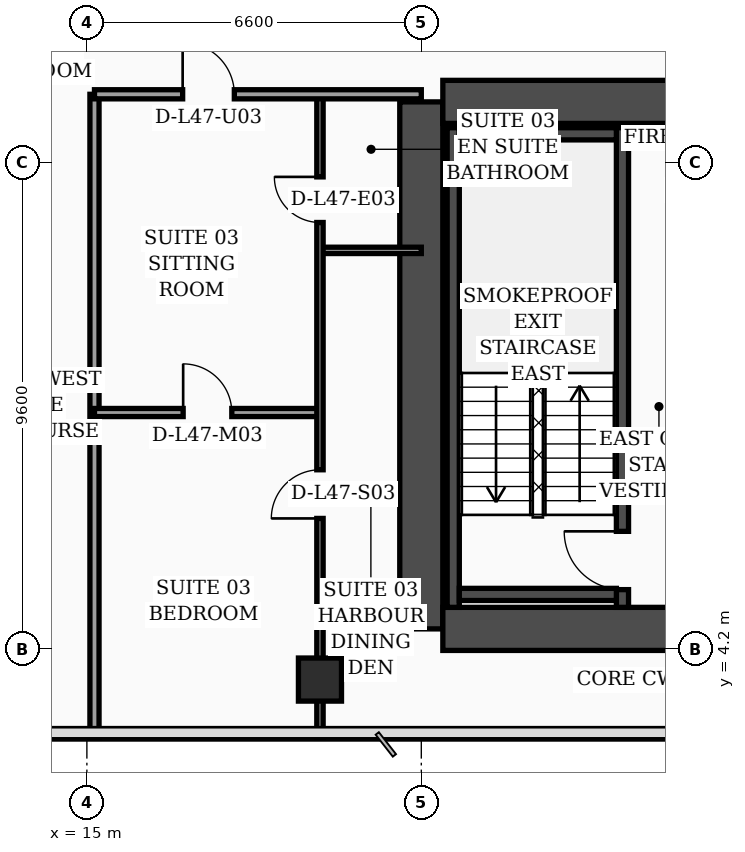
"""IFC4 building model, lengths in metres.
Left out: names, types, materials, properties, quantities, classifications, styles, units other than length and angle.
Written with IfcOpenShell. Run it as: python <this file> out.ifc"""

import sys

from ifc_helpers import new_model, si_unit, direction, frame, frame_2d, origin, origin_2d, place, context, subcontext, project, spatial, rectangle, hollow_rectangle, extrude, element, fill, save


model = new_model("IFC4")
c1 = context("Model", 3, precision=1e-05, world=origin(), true_north=direction((0.0, 1.0)))
c2 = subcontext(c1, "Body", "Model", "MODEL_VIEW")
j1 = project(units=[si_unit("LENGTHUNIT", "METRE"), si_unit("PLANEANGLEUNIT", "RADIAN")], contexts=[c1])
p1 = place(None, origin())
s1 = spatial("IfcSite", under=j1, at=p1, CompositionType="ELEMENT")
p2 = place(p1, origin())
s2 = spatial("IfcBuilding", under=s1, at=p2, CompositionType="ELEMENT")
p3 = place(p2, frame((0.0, 0.0, 191.3)))
s3 = spatial("IfcBuildingStorey", under=s2, at=p3, CompositionType="ELEMENT", Elevation=191.3)
p4 = place(p3, frame((21.6, 4.6, 0.0), z_axis=(0.0, 0.0, 1.0), x_axis=(0.0, 1.0, 0.0)))
e1 = element("IfcWall", 1, at=p4, inside=s3, PredefinedType="SHEAR", context=c2, shape_type="SweptSolid", body=[
    extrude(rectangle(XDim=10.4, YDim=0.85, at=frame_2d((5.2, 0.0))), origin(), (0.0, 0.0, 1.0), 3.56),
])
p5 = place(p3, frame((22.025, 15.0, 0.0), z_axis=(0.0, 0.0, 1.0), x_axis=(1.0, 0.0, 0.0)))
e2 = element("IfcWall", 2, at=p5, inside=s3, PredefinedType="SHEAR", context=c2, shape_type="SweptSolid", body=[
    extrude(rectangle(XDim=9.95, YDim=0.85, at=frame_2d((4.975, 0.0))), origin(), (0.0, 0.0, 1.0), 3.56),
])
p6 = place(p5, frame((4.88, 0.0, 0.0)))
e3 = element("IfcOpeningElement", 3, at=p6, cuts=e2, PredefinedType="OPENING", context=c2, shape_type="SweptSolid", body=[
    extrude(rectangle(XDim=1.1, YDim=2.2, at=frame_2d((0.55, 1.1))), frame((0.0, 0.435, 0.0), z_axis=(0.0, -1.0, 0.0), x_axis=(1.0, 0.0, 0.0)), (0.0, 0.0, 1.0), 0.87),
])
p7 = place(p3, frame((22.025, 4.6, 0.0), z_axis=(0.0, 0.0, 1.0), x_axis=(1.0, 0.0, 0.0)))
e4 = element("IfcWall", 4, at=p7, inside=s3, PredefinedType="SHEAR", context=c2, shape_type="SweptSolid", body=[
    extrude(rectangle(XDim=9.95, YDim=0.85, at=frame_2d((4.975, 0.0))), origin(), (0.0, 0.0, 1.0), 3.56),
])
p8 = place(p3, frame((22.23, 5.025, 0.0), z_axis=(0.0, 0.0, 1.0), x_axis=(0.0, 1.0, 0.0)))
e5 = element("IfcWall", 5, at=p8, inside=s3, PredefinedType="SOLIDWALL", context=c2, shape_type="SweptSolid", body=[
    extrude(rectangle(XDim=9.465, YDim=0.24, at=frame_2d((4.732, 0.0))), origin(), (0.0, 0.0, 1.0), 3.56),
])
p9 = place(p3, frame((25.57, 5.025, 0.0), z_axis=(0.0, 0.0, 1.0), x_axis=(0.0, 1.0, 0.0)))
e6 = element("IfcWall", 6, at=p9, inside=s3, PredefinedType="SOLIDWALL", context=c2, shape_type="SweptSolid", body=[
    extrude(rectangle(XDim=9.465, YDim=0.24, at=frame_2d((4.732, 0.0))), origin(), (0.0, 0.0, 1.0), 3.56),
])
p10 = place(p9, frame((0.35, 0.0, 0.0)))
e7 = element("IfcOpeningElement", 7, at=p10, cuts=e6, PredefinedType="OPENING", context=c2, shape_type="SweptSolid", body=[
    extrude(rectangle(XDim=1.15, YDim=2.2, at=frame_2d((0.575, 1.1))), frame((0.0, 0.13, 0.0), z_axis=(0.0, -1.0, 0.0), x_axis=(1.0, 0.0, 0.0)), (0.0, 0.0, 1.0), 0.26),
])
for number, where, z_axis, x_axis in (
    (8, (22.35, 5.28, 0.0), (0.0, 0.0, 1.0), (1.0, 0.0, 0.0)),
    (9, (22.35, 14.37, 0.0), (0.0, 0.0, 1.0), (1.0, 0.0, 0.0)),
):
    element("IfcWall", number, at=place(p3, frame(where, z_axis=z_axis, x_axis=x_axis)), inside=s3, PredefinedType="SOLIDWALL", context=c2, shape_type="SweptSolid", body=[
        extrude(rectangle(XDim=3.1, YDim=0.24, at=frame_2d((1.55, 0.0))), origin(), (0.0, 0.0, 1.0), 3.56),
    ])
p11 = place(p3, frame((19.6, 3.6, 0.0), z_axis=(0.0, 0.0, 1.0), x_axis=(1.0, 0.0, 0.0)))
e10 = element("IfcColumn", 10, at=p11, inside=s3, PredefinedType="COLUMN", context=c2, shape_type="SweptSolid", body=[
    extrude(hollow_rectangle(XDim=0.85, YDim=0.85, WallThickness=0.036, at=origin_2d()), origin(), (0.0, 0.0, 1.0), 3.56),
])
p12 = place(p3, frame((15.15, 2.44, 0.0), z_axis=(0.0, 0.0, 1.0), x_axis=(0.0, 1.0, 0.0)))
e11 = element("IfcWall", 11, at=p12, inside=s3, PredefinedType="PARTITIONING", context=c2, shape_type="SweptSolid", body=[
    extrude(rectangle(XDim=12.71, YDim=0.18, at=frame_2d((6.355, 0.0))), origin(), (0.0, 0.0, 1.0), 3.09),
])
p13 = place(p3, frame((19.6, 12.07, 0.0), z_axis=(0.0, 0.0, 1.0), x_axis=(1.0, 0.0, 0.0)))
e12 = element("IfcWall", 12, at=p13, inside=s3, PredefinedType="PARTITIONING", context=c2, shape_type="SweptSolid", body=[
    extrude(rectangle(XDim=2.0, YDim=0.125, at=frame_2d((1.0, 0.0))), origin(), (0.0, 0.0, 1.0), 3.56),
])
p14 = place(p3, frame((15.15, 8.87, 0.0), z_axis=(0.0, 0.0, 1.0), x_axis=(1.0, 0.0, 0.0)))
e13 = element("IfcWall", 13, at=p14, inside=s3, PredefinedType="PARTITIONING", context=c2, shape_type="SweptSolid", body=[
    extrude(rectangle(XDim=4.45, YDim=0.16, at=frame_2d((2.225, 0.0))), origin(), (0.0, 0.0, 1.0), 3.56),
])
p15 = place(p14, frame((1.75, 0.0, 0.0)))
e14 = element("IfcOpeningElement", 14, at=p15, cuts=e13, PredefinedType="OPENING", context=c2, shape_type="SweptSolid", body=[
    extrude(rectangle(XDim=0.96, YDim=2.2, at=frame_2d((0.48, 1.1))), frame((0.0, 0.09, 0.0), z_axis=(0.0, -1.0, 0.0), x_axis=(1.0, 0.0, 0.0)), (0.0, 0.0, 1.0), 0.18),
])
p16 = place(p3, frame((19.6, 2.44, 0.0), z_axis=(0.0, 0.0, 1.0), x_axis=(0.0, 1.0, 0.0)))
e15 = element("IfcWall", 15, at=p16, inside=s3, PredefinedType="PARTITIONING", context=c2, shape_type="SweptSolid", body=[
    extrude(rectangle(XDim=12.71, YDim=0.125, at=frame_2d((6.355, 0.0))), origin(), (0.0, 0.0, 1.0), 2.49),
])
p17 = place(p16, frame((4.34, 0.0, 0.0)))
e16 = element("IfcOpeningElement", 16, at=p17, cuts=e15, PredefinedType="OPENING", context=c2, shape_type="SweptSolid", body=[
    extrude(rectangle(XDim=0.96, YDim=2.2, at=frame_2d((0.48, 1.1))), frame((0.0, 0.073, 0.0), z_axis=(0.0, -1.0, 0.0), x_axis=(1.0, 0.0, 0.0)), (0.0, 0.0, 1.0), 0.145),
])
p18 = place(p16, frame((10.18, 0.0, 0.0)))
e17 = element("IfcOpeningElement", 17, at=p18, cuts=e15, PredefinedType="OPENING", context=c2, shape_type="SweptSolid", body=[
    extrude(rectangle(XDim=0.9, YDim=2.15, at=frame_2d((0.45, 1.075))), frame((0.0, 0.073, 0.0), z_axis=(0.0, -1.0, 0.0), x_axis=(1.0, 0.0, 0.0)), (0.0, 0.0, 1.0), 0.145),
])
p19 = place(p3, frame((15.15, 15.15, 0.0), z_axis=(0.0, 0.0, 1.0), x_axis=(1.0, 0.0, 0.0)))
e18 = element("IfcWall", 18, at=p19, inside=s3, PredefinedType="PARTITIONING", context=c2, shape_type="SweptSolid", body=[
    extrude(rectangle(XDim=6.45, YDim=0.18, at=frame_2d((3.225, 0.0))), origin(), (0.0, 0.0, 1.0), 2.49),
])
p20 = place(p19, frame((1.74, 0.0, 0.0)))
e19 = element("IfcOpeningElement", 19, at=p20, cuts=e18, PredefinedType="OPENING", context=c2, shape_type="SweptSolid", body=[
    extrude(rectangle(XDim=1.02, YDim=2.2, at=frame_2d((0.51, 1.1))), frame((0.0, 0.1, 0.0), z_axis=(0.0, -1.0, 0.0), x_axis=(1.0, 0.0, 0.0)), (0.0, 0.0, 1.0), 0.2),
])
p21 = place(p15, origin())
e20 = element("IfcDoor", 20, at=p21, inside=s3, OperationType="SINGLE_SWING_LEFT", PredefinedType="DOOR", context=c2, shape_type="SweptSolid", body=[
    extrude(rectangle(XDim=0.96, YDim=2.2, at=frame_2d((0.48, 1.1))), frame((0.0, 0.025, 0.0), z_axis=(0.0, -1.0, 0.0), x_axis=(1.0, 0.0, 0.0)), (0.0, 0.0, 1.0), 0.05),
])
fill(e14, e20)
p22 = place(p17, origin())
e21 = element("IfcDoor", 21, at=p22, inside=s3, OperationType="SINGLE_SWING_LEFT", PredefinedType="DOOR", context=c2, shape_type="SweptSolid", body=[
    extrude(rectangle(XDim=0.96, YDim=2.2, at=frame_2d((0.48, 1.1))), frame((0.0, 0.025, 0.0), z_axis=(0.0, -1.0, 0.0), x_axis=(1.0, 0.0, 0.0)), (0.0, 0.0, 1.0), 0.05),
])
fill(e16, e21)
p23 = place(p18, origin())
e22 = element("IfcDoor", 22, at=p23, inside=s3, OperationType="SINGLE_SWING_RIGHT", PredefinedType="DOOR", context=c2, shape_type="SweptSolid", body=[
    extrude(rectangle(XDim=0.9, YDim=2.15, at=frame_2d((0.45, 1.075))), frame((0.0, 0.025, 0.0), z_axis=(0.0, -1.0, 0.0), x_axis=(1.0, 0.0, 0.0)), (0.0, 0.0, 1.0), 0.05),
])
fill(e17, e22)
p24 = place(p20, origin())
e23 = element("IfcDoor", 23, at=p24, inside=s3, OperationType="SINGLE_SWING_LEFT", PredefinedType="DOOR", context=c2, shape_type="SweptSolid", body=[
    extrude(rectangle(XDim=1.02, YDim=2.2, at=frame_2d((0.51, 1.1))), frame((0.0, 0.025, 0.0), z_axis=(0.0, -1.0, 0.0), x_axis=(1.0, 0.0, 0.0)), (0.0, 0.0, 1.0), 0.05),
])
fill(e19, e23)
p25 = place(p10, origin())
e24 = element("IfcDoor", 24, at=p25, inside=s3, OperationType="SINGLE_SWING_RIGHT", PredefinedType="DOOR", context=c2, shape_type="SweptSolid", body=[
    extrude(rectangle(XDim=1.15, YDim=2.2, at=frame_2d((0.575, 1.1))), frame((0.0, 0.025, 0.0), z_axis=(0.0, -1.0, 0.0), x_axis=(1.0, 0.0, 0.0)), (0.0, 0.0, 1.0), 0.05),
])
fill(e7, e24)
save(model, sys.argv[1])
